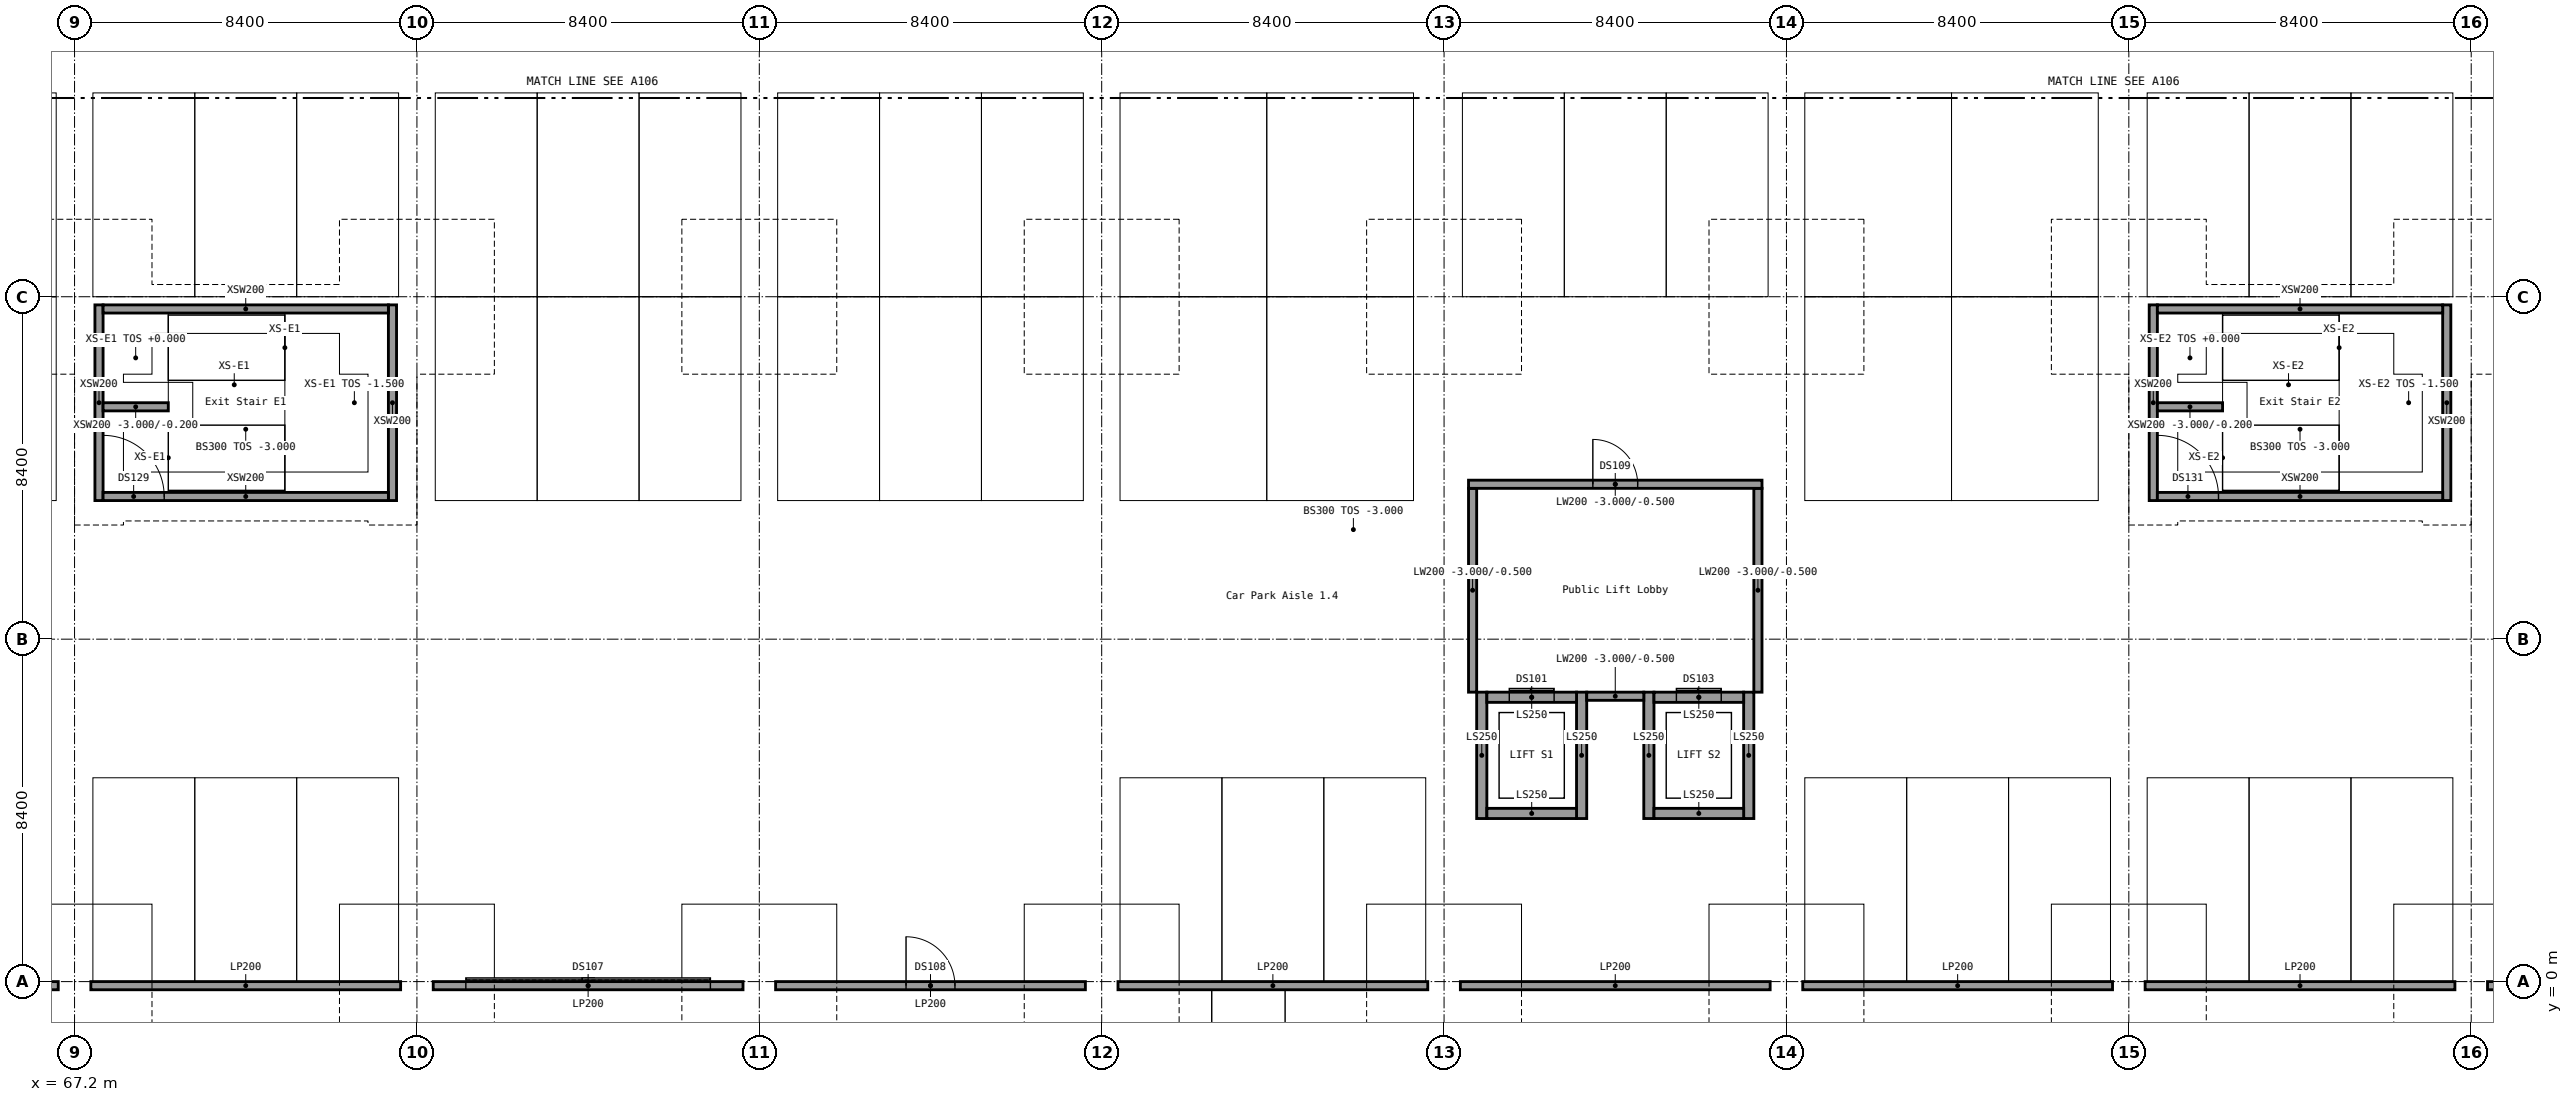
"""IFC4 building model, lengths in metres.
Left out: names, types, materials, properties, quantities, classifications, styles, units other than length and angle.
Written with IfcOpenShell. Run it as: python <this file> out.ifc"""

import sys

from ifc_helpers import new_model, si_unit, direction, frame, frame_2d, origin, origin_2d, place, context, subcontext, project, spatial, rectangle, extrude, element, fill, save


model = new_model("IFC4")
c1 = context("Model", 3, precision=1e-05, world=origin(), true_north=direction((0.0, 1.0)))
c2 = subcontext(c1, "Body", "Model", "MODEL_VIEW")
j1 = project(units=[si_unit("LENGTHUNIT", "METRE"), si_unit("PLANEANGLEUNIT", "RADIAN")], contexts=[c1])
p1 = place(None, origin())
s1 = spatial("IfcSite", under=j1, at=p1, CompositionType="ELEMENT")
p2 = place(p1, origin())
s2 = spatial("IfcBuilding", under=s1, at=p2, CompositionType="ELEMENT")
p3 = place(p2, frame((0.0, 0.0, -3.0)))
s3 = spatial("IfcBuildingStorey", under=s2, at=p3, CompositionType="ELEMENT", Elevation=-3.0)
for number, where, z_axis, x_axis in (
    (1, (67.2, 0.0, 0.0), (0.0, 0.0, 1.0), (1.0, 0.0, 0.0)),
    (2, (75.6, 0.0, 0.0), (0.0, 0.0, 1.0), (1.0, 0.0, 0.0)),
    (3, (84.0, 0.0, 0.0), (0.0, 0.0, 1.0), (1.0, 0.0, 0.0)),
    (4, (92.4, 0.0, 0.0), (0.0, 0.0, 1.0), (1.0, 0.0, 0.0)),
    (5, (100.8, 0.0, 0.0), (0.0, 0.0, 1.0), (1.0, 0.0, 0.0)),
    (6, (109.2, 0.0, 0.0), (0.0, 0.0, 1.0), (1.0, 0.0, 0.0)),
    (7, (117.6, 0.0, 0.0), (0.0, 0.0, 1.0), (1.0, 0.0, 0.0)),
    (8, (126.0, 0.0, 0.0), (0.0, 0.0, 1.0), (1.0, 0.0, 0.0)),
    (9, (67.2, 16.8, 0.0), (0.0, 0.0, 1.0), (1.0, 0.0, 0.0)),
    (10, (75.6, 16.8, 0.0), (0.0, 0.0, 1.0), (1.0, 0.0, 0.0)),
    (11, (84.0, 16.8, 0.0), (0.0, 0.0, 1.0), (1.0, 0.0, 0.0)),
    (12, (92.4, 16.8, 0.0), (0.0, 0.0, 1.0), (1.0, 0.0, 0.0)),
    (13, (100.8, 16.8, 0.0), (0.0, 0.0, 1.0), (1.0, 0.0, 0.0)),
    (14, (109.2, 16.8, 0.0), (0.0, 0.0, 1.0), (1.0, 0.0, 0.0)),
    (15, (117.6, 16.8, 0.0), (0.0, 0.0, 1.0), (1.0, 0.0, 0.0)),
    (16, (126.0, 16.8, 0.0), (0.0, 0.0, 1.0), (1.0, 0.0, 0.0)),
):
    element("IfcColumn", number, at=place(p3, frame(where, z_axis=z_axis, x_axis=x_axis)), inside=s3, PredefinedType="COLUMN", context=c2, shape_type="SweptSolid", body=[
        extrude(rectangle(XDim=0.8, YDim=0.8, at=origin_2d()), origin(), (0.0, 0.0, 1.0), 2.5),
    ])
for number, where, z_axis, x_axis in (
    (17, (101.725, 4.0, -1.5), (0.0, 0.0, 1.0), (0.0, 1.0, 0.0)),
    (18, (104.175, 4.0, -1.5), (0.0, 0.0, 1.0), (0.0, 1.0, 0.0)),
):
    element("IfcWall", number, at=place(p3, frame(where, z_axis=z_axis, x_axis=x_axis)), inside=s3, PredefinedType="SHEAR", context=c2, shape_type="SweptSolid", body=[
        extrude(rectangle(XDim=3.1, YDim=0.25, at=frame_2d((1.55, 0.0))), origin(), (0.0, 0.0, 1.0), 4.5),
    ])
p4 = place(p3, frame((101.85, 4.125, -1.5), z_axis=(0.0, 0.0, 1.0), x_axis=(1.0, 0.0, 0.0)))
e19 = element("IfcWall", 19, at=p4, inside=s3, PredefinedType="SHEAR", context=c2, shape_type="SweptSolid", body=[
    extrude(rectangle(XDim=2.2, YDim=0.25, at=frame_2d((1.1, 0.0))), origin(), (0.0, 0.0, 1.0), 4.5),
])
p5 = place(p3, frame((101.85, 6.975, -1.5), z_axis=(0.0, 0.0, 1.0), x_axis=(1.0, 0.0, 0.0)))
e20 = element("IfcWall", 20, at=p5, inside=s3, PredefinedType="SHEAR", context=c2, shape_type="SweptSolid", body=[
    extrude(rectangle(XDim=2.2, YDim=0.25, at=frame_2d((1.1, 0.0))), origin(), (0.0, 0.0, 1.0), 4.5),
])
p6 = place(p5, frame((0.55, 0.0, 1.5)))
e21 = element("IfcOpeningElement", 21, at=p6, cuts=e20, PredefinedType="OPENING", context=c2, shape_type="SweptSolid", body=[
    extrude(rectangle(XDim=1.1, YDim=2.1, at=frame_2d((0.55, 1.05))), frame((0.0, 0.125, 0.0), z_axis=(0.0, -1.0, 0.0), x_axis=(1.0, 0.0, 0.0)), (0.0, 0.0, 1.0), 0.25),
])
for number, where, z_axis, x_axis in (
    (22, (105.825, 4.0, -1.5), (0.0, 0.0, 1.0), (0.0, 1.0, 0.0)),
    (23, (108.275, 4.0, -1.5), (0.0, 0.0, 1.0), (0.0, 1.0, 0.0)),
):
    element("IfcWall", number, at=place(p3, frame(where, z_axis=z_axis, x_axis=x_axis)), inside=s3, PredefinedType="SHEAR", context=c2, shape_type="SweptSolid", body=[
        extrude(rectangle(XDim=3.1, YDim=0.25, at=frame_2d((1.55, 0.0))), origin(), (0.0, 0.0, 1.0), 4.5),
    ])
p7 = place(p3, frame((105.95, 4.125, -1.5), z_axis=(0.0, 0.0, 1.0), x_axis=(1.0, 0.0, 0.0)))
e24 = element("IfcWall", 24, at=p7, inside=s3, PredefinedType="SHEAR", context=c2, shape_type="SweptSolid", body=[
    extrude(rectangle(XDim=2.2, YDim=0.25, at=frame_2d((1.1, 0.0))), origin(), (0.0, 0.0, 1.0), 4.5),
])
p8 = place(p3, frame((105.95, 6.975, -1.5), z_axis=(0.0, 0.0, 1.0), x_axis=(1.0, 0.0, 0.0)))
e25 = element("IfcWall", 25, at=p8, inside=s3, PredefinedType="SHEAR", context=c2, shape_type="SweptSolid", body=[
    extrude(rectangle(XDim=2.2, YDim=0.25, at=frame_2d((1.1, 0.0))), origin(), (0.0, 0.0, 1.0), 4.5),
])
p9 = place(p8, frame((0.55, 0.0, 1.5)))
e26 = element("IfcOpeningElement", 26, at=p9, cuts=e25, PredefinedType="OPENING", context=c2, shape_type="SweptSolid", body=[
    extrude(rectangle(XDim=1.1, YDim=2.1, at=frame_2d((0.55, 1.05))), frame((0.0, 0.125, 0.0), z_axis=(0.0, -1.0, 0.0), x_axis=(1.0, 0.0, 0.0)), (0.0, 0.0, 1.0), 0.25),
])
for number, where, z_axis, x_axis in (
    (27, (67.8, 11.8, 0.0), (0.0, 0.0, 1.0), (0.0, 1.0, 0.0)),
    (28, (75.0, 11.8, 0.0), (0.0, 0.0, 1.0), (0.0, 1.0, 0.0)),
):
    element("IfcWall", number, at=place(p3, frame(where, z_axis=z_axis, x_axis=x_axis)), inside=s3, PredefinedType="SOLIDWALL", context=c2, shape_type="SweptSolid", body=[
        extrude(rectangle(XDim=4.8, YDim=0.2, at=frame_2d((2.4, 0.0))), origin(), (0.0, 0.0, 1.0), 3.0),
    ])
p10 = place(p3, frame((67.9, 11.9, 0.0), z_axis=(0.0, 0.0, 1.0), x_axis=(1.0, 0.0, 0.0)))
e29 = element("IfcWall", 29, at=p10, inside=s3, PredefinedType="SOLIDWALL", context=c2, shape_type="SweptSolid", body=[
    extrude(rectangle(XDim=7.0, YDim=0.2, at=frame_2d((3.5, 0.0))), origin(), (0.0, 0.0, 1.0), 3.0),
])
p11 = place(p10, origin())
e30 = element("IfcOpeningElement", 30, at=p11, cuts=e29, PredefinedType="OPENING", context=c2, shape_type="SweptSolid", body=[
    extrude(rectangle(XDim=1.5, YDim=2.1, at=frame_2d((0.75, 1.05))), frame((0.0, 0.1, 0.0), z_axis=(0.0, -1.0, 0.0), x_axis=(1.0, 0.0, 0.0)), (0.0, 0.0, 1.0), 0.2),
])
p12 = place(p3, frame((67.9, 16.5, 0.0), z_axis=(0.0, 0.0, 1.0), x_axis=(1.0, 0.0, 0.0)))
e31 = element("IfcWall", 31, at=p12, inside=s3, PredefinedType="SOLIDWALL", context=c2, shape_type="SweptSolid", body=[
    extrude(rectangle(XDim=7.0, YDim=0.2, at=frame_2d((3.5, 0.0))), origin(), (0.0, 0.0, 1.0), 3.0),
])
p13 = place(p3, frame((67.9, 14.1, 0.0), z_axis=(0.0, 0.0, 1.0), x_axis=(1.0, 0.0, 0.0)))
e32 = element("IfcWall", 32, at=p13, inside=s3, PredefinedType="SOLIDWALL", context=c2, shape_type="SweptSolid", body=[
    extrude(rectangle(XDim=1.6, YDim=0.2, at=frame_2d((0.8, 0.0))), origin(), (0.0, 0.0, 1.0), 2.8),
])
for number, where, z_axis, x_axis in (
    (33, (118.2, 11.8, 0.0), (0.0, 0.0, 1.0), (0.0, 1.0, 0.0)),
    (34, (125.4, 11.8, 0.0), (0.0, 0.0, 1.0), (0.0, 1.0, 0.0)),
):
    element("IfcWall", number, at=place(p3, frame(where, z_axis=z_axis, x_axis=x_axis)), inside=s3, PredefinedType="SOLIDWALL", context=c2, shape_type="SweptSolid", body=[
        extrude(rectangle(XDim=4.8, YDim=0.2, at=frame_2d((2.4, 0.0))), origin(), (0.0, 0.0, 1.0), 3.0),
    ])
p14 = place(p3, frame((118.3, 11.9, 0.0), z_axis=(0.0, 0.0, 1.0), x_axis=(1.0, 0.0, 0.0)))
e35 = element("IfcWall", 35, at=p14, inside=s3, PredefinedType="SOLIDWALL", context=c2, shape_type="SweptSolid", body=[
    extrude(rectangle(XDim=7.0, YDim=0.2, at=frame_2d((3.5, 0.0))), origin(), (0.0, 0.0, 1.0), 3.0),
])
p15 = place(p14, origin())
e36 = element("IfcOpeningElement", 36, at=p15, cuts=e35, PredefinedType="OPENING", context=c2, shape_type="SweptSolid", body=[
    extrude(rectangle(XDim=1.5, YDim=2.1, at=frame_2d((0.75, 1.05))), frame((0.0, 0.1, 0.0), z_axis=(0.0, -1.0, 0.0), x_axis=(1.0, 0.0, 0.0)), (0.0, 0.0, 1.0), 0.2),
])
p16 = place(p3, frame((118.3, 16.5, 0.0), z_axis=(0.0, 0.0, 1.0), x_axis=(1.0, 0.0, 0.0)))
e37 = element("IfcWall", 37, at=p16, inside=s3, PredefinedType="SOLIDWALL", context=c2, shape_type="SweptSolid", body=[
    extrude(rectangle(XDim=7.0, YDim=0.2, at=frame_2d((3.5, 0.0))), origin(), (0.0, 0.0, 1.0), 3.0),
])
p17 = place(p3, frame((118.3, 14.1, 0.0), z_axis=(0.0, 0.0, 1.0), x_axis=(1.0, 0.0, 0.0)))
e38 = element("IfcWall", 38, at=p17, inside=s3, PredefinedType="SOLIDWALL", context=c2, shape_type="SweptSolid", body=[
    extrude(rectangle(XDim=1.6, YDim=0.2, at=frame_2d((0.8, 0.0))), origin(), (0.0, 0.0, 1.0), 2.8),
])
p18 = place(p3, frame((59.2, -0.1, 0.0), z_axis=(0.0, 0.0, 1.0), x_axis=(1.0, 0.0, 0.0)))
e39 = element("IfcWall", 39, at=p18, inside=s3, PredefinedType="SOLIDWALL", context=c2, shape_type="SweptSolid", body=[
    extrude(rectangle(XDim=7.6, YDim=0.2, at=frame_2d((3.8, 0.0))), origin(), (0.0, 0.0, 1.0), 2.5),
])
p19 = place(p18, frame((0.8, 0.0, 0.0)))
e40 = element("IfcOpeningElement", 40, at=p19, cuts=e39, PredefinedType="OPENING", context=c2, shape_type="SweptSolid", body=[
    extrude(rectangle(XDim=6.0, YDim=2.8, at=frame_2d((3.0, 1.4))), frame((0.0, 0.1, 0.0), z_axis=(0.0, -1.0, 0.0), x_axis=(1.0, 0.0, 0.0)), (0.0, 0.0, 1.0), 0.2),
])
p20 = place(p3, frame((67.6, -0.1, 0.0), z_axis=(0.0, 0.0, 1.0), x_axis=(1.0, 0.0, 0.0)))
e41 = element("IfcWall", 41, at=p20, inside=s3, PredefinedType="SOLIDWALL", context=c2, shape_type="SweptSolid", body=[
    extrude(rectangle(XDim=7.6, YDim=0.2, at=frame_2d((3.8, 0.0))), origin(), (0.0, 0.0, 1.0), 2.5),
])
p21 = place(p3, frame((76.0, -0.1, 0.0), z_axis=(0.0, 0.0, 1.0), x_axis=(1.0, 0.0, 0.0)))
e42 = element("IfcWall", 42, at=p21, inside=s3, PredefinedType="SOLIDWALL", context=c2, shape_type="SweptSolid", body=[
    extrude(rectangle(XDim=7.6, YDim=0.2, at=frame_2d((3.8, 0.0))), origin(), (0.0, 0.0, 1.0), 2.5),
])
p22 = place(p21, frame((0.8, 0.0, 0.0)))
e43 = element("IfcOpeningElement", 43, at=p22, cuts=e42, PredefinedType="OPENING", context=c2, shape_type="SweptSolid", body=[
    extrude(rectangle(XDim=6.0, YDim=2.8, at=frame_2d((3.0, 1.4))), frame((0.0, 0.1, 0.0), z_axis=(0.0, -1.0, 0.0), x_axis=(1.0, 0.0, 0.0)), (0.0, 0.0, 1.0), 0.2),
])
p23 = place(p3, frame((84.4, -0.1, 0.0), z_axis=(0.0, 0.0, 1.0), x_axis=(1.0, 0.0, 0.0)))
e44 = element("IfcWall", 44, at=p23, inside=s3, PredefinedType="SOLIDWALL", context=c2, shape_type="SweptSolid", body=[
    extrude(rectangle(XDim=7.6, YDim=0.2, at=frame_2d((3.8, 0.0))), origin(), (0.0, 0.0, 1.0), 2.5),
])
p24 = place(p23, frame((3.2, 0.0, 0.0)))
e45 = element("IfcOpeningElement", 45, at=p24, cuts=e44, PredefinedType="OPENING", context=c2, shape_type="SweptSolid", body=[
    extrude(rectangle(XDim=1.2, YDim=2.1, at=frame_2d((0.6, 1.05))), frame((0.0, 0.1, 0.0), z_axis=(0.0, -1.0, 0.0), x_axis=(1.0, 0.0, 0.0)), (0.0, 0.0, 1.0), 0.2),
])
p25 = place(p3, frame((92.8, -0.1, 0.0), z_axis=(0.0, 0.0, 1.0), x_axis=(1.0, 0.0, 0.0)))
e46 = element("IfcWall", 46, at=p25, inside=s3, PredefinedType="SOLIDWALL", context=c2, shape_type="SweptSolid", body=[
    extrude(rectangle(XDim=7.6, YDim=0.2, at=frame_2d((3.8, 0.0))), origin(), (0.0, 0.0, 1.0), 2.5),
])
p26 = place(p3, frame((101.2, -0.1, 0.0), z_axis=(0.0, 0.0, 1.0), x_axis=(1.0, 0.0, 0.0)))
e47 = element("IfcWall", 47, at=p26, inside=s3, PredefinedType="SOLIDWALL", context=c2, shape_type="SweptSolid", body=[
    extrude(rectangle(XDim=7.6, YDim=0.2, at=frame_2d((3.8, 0.0))), origin(), (0.0, 0.0, 1.0), 2.5),
])
p27 = place(p3, frame((109.6, -0.1, 0.0), z_axis=(0.0, 0.0, 1.0), x_axis=(1.0, 0.0, 0.0)))
e48 = element("IfcWall", 48, at=p27, inside=s3, PredefinedType="SOLIDWALL", context=c2, shape_type="SweptSolid", body=[
    extrude(rectangle(XDim=7.6, YDim=0.2, at=frame_2d((3.8, 0.0))), origin(), (0.0, 0.0, 1.0), 2.5),
])
for number, where, z_axis, x_axis in (
    (49, (118.0, -0.1, 0.0), (0.0, 0.0, 1.0), (1.0, 0.0, 0.0)),
    (50, (126.4, -0.1, 0.0), (0.0, 0.0, 1.0), (1.0, 0.0, 0.0)),
):
    element("IfcWall", number, at=place(p3, frame(where, z_axis=z_axis, x_axis=x_axis)), inside=s3, PredefinedType="SOLIDWALL", context=c2, shape_type="SweptSolid", body=[
        extrude(rectangle(XDim=7.6, YDim=0.2, at=frame_2d((3.8, 0.0))), origin(), (0.0, 0.0, 1.0), 2.5),
    ])
for number, where, z_axis, x_axis in (
    (51, (101.5, 7.1, 0.0), (0.0, 0.0, 1.0), (0.0, 1.0, 0.0)),
    (52, (108.5, 7.1, 0.0), (0.0, 0.0, 1.0), (0.0, 1.0, 0.0)),
):
    element("IfcWall", number, at=place(p3, frame(where, z_axis=z_axis, x_axis=x_axis)), inside=s3, PredefinedType="PARTITIONING", context=c2, shape_type="SweptSolid", body=[
        extrude(rectangle(XDim=5.0, YDim=0.2, at=frame_2d((2.5, 0.0))), origin(), (0.0, 0.0, 1.0), 2.5),
    ])
p28 = place(p3, frame((101.4, 12.2, 0.0), z_axis=(0.0, 0.0, 1.0), x_axis=(1.0, 0.0, 0.0)))
e53 = element("IfcWall", 53, at=p28, inside=s3, PredefinedType="PARTITIONING", context=c2, shape_type="SweptSolid", body=[
    extrude(rectangle(XDim=7.2, YDim=0.2, at=frame_2d((3.6, 0.0))), origin(), (0.0, 0.0, 1.0), 2.5),
])
p29 = place(p28, frame((3.05, 0.0, 0.0)))
e54 = element("IfcOpeningElement", 54, at=p29, cuts=e53, PredefinedType="OPENING", context=c2, shape_type="SweptSolid", body=[
    extrude(rectangle(XDim=1.1, YDim=2.1, at=frame_2d((0.55, 1.05))), frame((0.0, 0.1, 0.0), z_axis=(0.0, -1.0, 0.0), x_axis=(1.0, 0.0, 0.0)), (0.0, 0.0, 1.0), 0.2),
])
p30 = place(p3, frame((104.3, 7.0, 0.0), z_axis=(0.0, 0.0, 1.0), x_axis=(1.0, 0.0, 0.0)))
e55 = element("IfcWall", 55, at=p30, inside=s3, PredefinedType="PARTITIONING", context=c2, shape_type="SweptSolid", body=[
    extrude(rectangle(XDim=1.4, YDim=0.2, at=frame_2d((0.7, 0.0))), origin(), (0.0, 0.0, 1.0), 2.5),
])
p31 = place(p6, origin())
e56 = element("IfcDoor", 56, at=p31, inside=s3, OperationType="DOUBLE_DOOR_SLIDING", PredefinedType="DOOR", context=c2, shape_type="SweptSolid", body=[
    extrude(rectangle(XDim=1.1, YDim=2.1, at=frame_2d((0.55, 1.05))), frame((0.0, 0.025, 0.0), z_axis=(0.0, -1.0, 0.0), x_axis=(1.0, 0.0, 0.0)), (0.0, 0.0, 1.0), 0.05),
])
fill(e21, e56)
p32 = place(p9, origin())
e57 = element("IfcDoor", 57, at=p32, inside=s3, OperationType="DOUBLE_DOOR_SLIDING", PredefinedType="DOOR", context=c2, shape_type="SweptSolid", body=[
    extrude(rectangle(XDim=1.1, YDim=2.1, at=frame_2d((0.55, 1.05))), frame((0.0, 0.025, 0.0), z_axis=(0.0, -1.0, 0.0), x_axis=(1.0, 0.0, 0.0)), (0.0, 0.0, 1.0), 0.05),
])
fill(e26, e57)
p33 = place(p22, origin())
e58 = element("IfcDoor", 58, at=p33, inside=s3, OperationType="SLIDING_TO_LEFT", PredefinedType="GATE", context=c2, shape_type="SweptSolid", body=[
    extrude(rectangle(XDim=6.0, YDim=2.8, at=frame_2d((3.0, 1.4))), frame((0.0, 0.025, 0.0), z_axis=(0.0, -1.0, 0.0), x_axis=(1.0, 0.0, 0.0)), (0.0, 0.0, 1.0), 0.05),
])
fill(e43, e58)
p34 = place(p24, origin())
e59 = element("IfcDoor", 59, at=p34, inside=s3, OperationType="SINGLE_SWING_LEFT", PredefinedType="DOOR", context=c2, shape_type="SweptSolid", body=[
    extrude(rectangle(XDim=1.2, YDim=2.1, at=frame_2d((0.6, 1.05))), frame((0.0, 0.025, 0.0), z_axis=(0.0, -1.0, 0.0), x_axis=(1.0, 0.0, 0.0)), (0.0, 0.0, 1.0), 0.05),
])
fill(e45, e59)
p35 = place(p29, origin())
e60 = element("IfcDoor", 60, at=p35, inside=s3, OperationType="SINGLE_SWING_LEFT", PredefinedType="DOOR", context=c2, shape_type="SweptSolid", body=[
    extrude(rectangle(XDim=1.1, YDim=2.1, at=frame_2d((0.55, 1.05))), frame((0.0, 0.025, 0.0), z_axis=(0.0, -1.0, 0.0), x_axis=(1.0, 0.0, 0.0)), (0.0, 0.0, 1.0), 0.05),
])
fill(e54, e60)
p36 = place(p11, origin())
e61 = element("IfcDoor", 61, at=p36, inside=s3, OperationType="SINGLE_SWING_LEFT", PredefinedType="DOOR", context=c2, shape_type="SweptSolid", body=[
    extrude(rectangle(XDim=1.5, YDim=2.1, at=frame_2d((0.75, 1.05))), frame((0.0, 0.025, 0.0), z_axis=(0.0, -1.0, 0.0), x_axis=(1.0, 0.0, 0.0)), (0.0, 0.0, 1.0), 0.05),
])
fill(e30, e61)
p37 = place(p15, origin())
e62 = element("IfcDoor", 62, at=p37, inside=s3, OperationType="SINGLE_SWING_LEFT", PredefinedType="DOOR", context=c2, shape_type="SweptSolid", body=[
    extrude(rectangle(XDim=1.5, YDim=2.1, at=frame_2d((0.75, 1.05))), frame((0.0, 0.025, 0.0), z_axis=(0.0, -1.0, 0.0), x_axis=(1.0, 0.0, 0.0)), (0.0, 0.0, 1.0), 0.05),
])
fill(e36, e62)
save(model, sys.argv[1])
